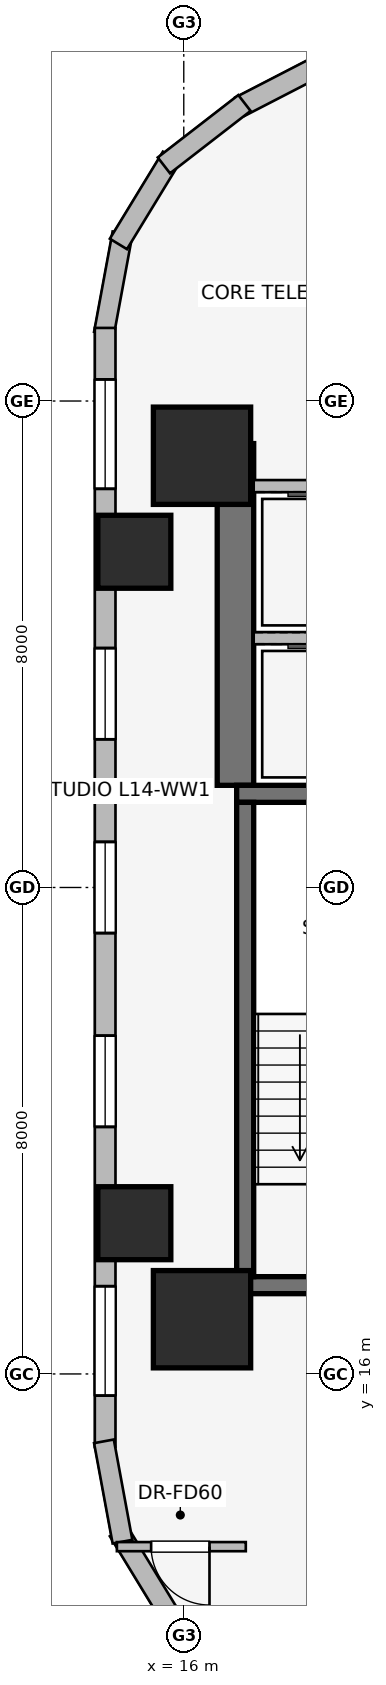
"""IFC4 building model, lengths in metres.
Left out: names, types, materials, properties, quantities, classifications, styles, units other than length and angle.
Written with IfcOpenShell. Run it as: python <this file> out.ifc"""

import sys

from ifc_helpers import new_model, si_unit, direction, frame, frame_2d, origin, origin_2d, place, context, subcontext, project, spatial, rectangle, extrude, element, fill, save


model = new_model("IFC4")
c1 = context("Model", 3, precision=1e-05, world=origin(), true_north=direction((0.0, 1.0)))
c2 = subcontext(c1, "Body", "Model", "MODEL_VIEW")
j1 = project(units=[si_unit("LENGTHUNIT", "METRE"), si_unit("PLANEANGLEUNIT", "RADIAN")], contexts=[c1])
p1 = place(None, origin())
s1 = spatial("IfcSite", under=j1, at=p1, CompositionType="ELEMENT")
p2 = place(p1, origin())
s2 = spatial("IfcBuilding", under=s1, at=p2, CompositionType="ELEMENT")
p3 = place(p2, frame((0.0, 0.0, 56.2)))
s3 = spatial("IfcBuildingStorey", under=s2, at=p3, CompositionType="ELEMENT", Elevation=56.2)
p4 = place(p3, frame((16.85, 25.68, 0.0), z_axis=(0.0, 0.0, 1.0), x_axis=(0.0, 1.0, 0.0)))
e1 = element("IfcWall", 1, at=p4, inside=s3, PredefinedType="SHEAR", context=c2, shape_type="SweptSolid", body=[
    extrude(rectangle(XDim=5.62, YDim=0.6, at=frame_2d((2.81, 0.0))), origin(), (0.0, 0.0, 1.0), 3.65),
])
for number, where, z_axis, x_axis in (
    (2, (16.87, 17.46, 0.0), (0.0, 0.0, 1.0), (1.0, 0.0, 0.0)),
    (3, (20.63, 25.54, 0.0), (0.0, 0.0, 1.0), (-1.0, 0.0, 0.0)),
):
    element("IfcWall", number, at=place(p3, frame(where, z_axis=z_axis, x_axis=x_axis)), inside=s3, PredefinedType="SHEAR", context=c2, shape_type="SweptSolid", body=[
        extrude(rectangle(XDim=3.76, YDim=0.28, at=frame_2d((1.88, 0.0))), origin(), (0.0, 0.0, 1.0), 3.65),
    ])
p5 = place(p3, frame((17.01, 25.4, 0.0), z_axis=(0.0, 0.0, 1.0), x_axis=(0.0, -1.0, 0.0)))
e4 = element("IfcWall", 4, at=p5, inside=s3, PredefinedType="SHEAR", context=c2, shape_type="SweptSolid", body=[
    extrude(rectangle(XDim=7.8, YDim=0.28, at=frame_2d((3.9, 0.0))), origin(), (0.0, 0.0, 1.0), 3.65),
])
for number, where, z_axis, x_axis in (
    (5, (16.3, 16.9, 0.0), (0.0, 0.0, 1.0), (1.0, 0.0, 0.0)),
    (6, (16.3, 31.1, 0.0), (0.0, 0.0, 1.0), (1.0, 0.0, 0.0)),
):
    element("IfcColumn", number, at=place(p3, frame(where, z_axis=z_axis, x_axis=x_axis)), inside=s3, PredefinedType="COLUMN", context=c2, shape_type="SweptSolid", body=[
        extrude(rectangle(XDim=1.6, YDim=1.6, at=origin_2d()), origin(), (0.0, 0.0, 1.0), 3.65),
    ])
for number, where, z_axis, x_axis in (
    (7, (15.187, 29.521, 0.0), (0.0, 0.0, 1.0), (1.0, 0.0, 0.0)),
    (8, (15.187, 18.479, 0.0), (0.0, 0.0, 1.0), (1.0, 0.0, 0.0)),
):
    element("IfcColumn", number, at=place(p3, frame(where, z_axis=z_axis, x_axis=x_axis)), inside=s3, PredefinedType="COLUMN", context=c2, shape_type="SweptSolid", body=[
        extrude(rectangle(XDim=1.2, YDim=1.2, at=origin_2d()), origin(), (0.0, 0.0, 1.0), 3.65),
    ])
p6 = place(p3, frame((16.924, 36.841, 0.0), z_axis=(0.0, 0.0, 1.0), x_axis=(0.888634413993, 0.458616264721, 0.0)))
e9 = element("IfcWall", 9, at=p6, inside=s3, PredefinedType="STANDARD", context=c2, shape_type="SweptSolid", body=[
    extrude(rectangle(XDim=20.531, YDim=0.34, at=frame_2d((10.266, 0.0))), origin(), (0.0, 0.0, 1.0), 2.654),
])
p7 = place(p6, frame((2.161, 0.0, 0.75)))
e10 = element("IfcOpeningElement", 10, at=p7, cuts=e9, PredefinedType="OPENING", context=c2, shape_type="SweptSolid", body=[
    extrude(rectangle(XDim=1.05, YDim=1.4, at=frame_2d((0.525, 0.7))), frame((0.0, 0.18, 0.0), z_axis=(0.0, -1.0, 0.0), x_axis=(1.0, 0.0, 0.0)), (0.0, 0.0, 1.0), 0.36),
])
p8 = place(p6, frame((5.903, 0.0, 0.75)))
e11 = element("IfcOpeningElement", 11, at=p8, cuts=e9, PredefinedType="OPENING", context=c2, shape_type="SweptSolid", body=[
    extrude(rectangle(XDim=1.5, YDim=1.5, at=frame_2d((0.75, 0.75))), frame((0.0, 0.18, 0.0), z_axis=(0.0, -1.0, 0.0), x_axis=(1.0, 0.0, 0.0)), (0.0, 0.0, 1.0), 0.36),
])
p9 = place(p6, frame((9.516, 0.0, 0.75)))
e12 = element("IfcOpeningElement", 12, at=p9, cuts=e9, PredefinedType="OPENING", context=c2, shape_type="SweptSolid", body=[
    extrude(rectangle(XDim=1.5, YDim=1.5, at=frame_2d((0.75, 0.75))), frame((0.0, 0.18, 0.0), z_axis=(0.0, -1.0, 0.0), x_axis=(1.0, 0.0, 0.0)), (0.0, 0.0, 1.0), 0.36),
])
p10 = place(p6, frame((13.129, 0.0, 0.75)))
e13 = element("IfcOpeningElement", 13, at=p10, cuts=e9, PredefinedType="OPENING", context=c2, shape_type="SweptSolid", body=[
    extrude(rectangle(XDim=1.5, YDim=1.5, at=frame_2d((0.75, 0.75))), frame((0.0, 0.18, 0.0), z_axis=(0.0, -1.0, 0.0), x_axis=(1.0, 0.0, 0.0)), (0.0, 0.0, 1.0), 0.36),
])
p11 = place(p6, frame((17.476, 0.0, 0.75)))
e14 = element("IfcOpeningElement", 14, at=p11, cuts=e9, PredefinedType="OPENING", context=c2, shape_type="SweptSolid", body=[
    extrude(rectangle(XDim=1.05, YDim=1.4, at=frame_2d((0.525, 0.7))), frame((0.0, 0.18, 0.0), z_axis=(0.0, -1.0, 0.0), x_axis=(1.0, 0.0, 0.0)), (0.0, 0.0, 1.0), 0.36),
])
p12 = place(p3, frame((14.687, 33.108, 0.0), z_axis=(0.0, 0.0, 1.0), x_axis=(0.181714143354, 0.983351397063, 0.0)))
e15 = element("IfcWall", 15, at=p12, inside=s3, PredefinedType="STANDARD", context=c2, shape_type="SweptSolid", body=[
    extrude(rectangle(XDim=1.678, YDim=0.33, at=frame_2d((0.839, 0.0))), origin(), (0.0, 0.0, 1.0), 3.36),
])
p13 = place(p3, frame((14.925, 34.583, 0.0), z_axis=(0.0, 0.0, 1.0), x_axis=(0.520584129191, 0.853810379671, 0.0)))
e16 = element("IfcWall", 16, at=p13, inside=s3, PredefinedType="STANDARD", context=c2, shape_type="SweptSolid", body=[
    extrude(rectangle(XDim=1.677, YDim=0.33, at=frame_2d((0.838, 0.0))), origin(), (0.0, 0.0, 1.0), 3.36),
])
p14 = place(p3, frame((15.673, 35.875, 0.0), z_axis=(0.0, 0.0, 1.0), x_axis=(0.790691856293, 0.61221433207, 0.0)))
e17 = element("IfcWall", 17, at=p14, inside=s3, PredefinedType="STANDARD", context=c2, shape_type="SweptSolid", body=[
    extrude(rectangle(XDim=1.676, YDim=0.33, at=frame_2d((0.838, 0.0))), origin(), (0.0, 0.0, 1.0), 3.36),
])
p15 = place(p3, frame((14.707, 14.798, 0.0), z_axis=(0.0, 0.0, 1.0), x_axis=(0.0, 1.0, 0.0)))
e18 = element("IfcWall", 18, at=p15, inside=s3, PredefinedType="STANDARD", context=c2, shape_type="SweptSolid", body=[
    extrude(rectangle(XDim=18.404, YDim=0.34, at=frame_2d((9.202, 0.0))), origin(), (0.0, 0.0, 1.0), 2.654),
])
p16 = place(p15, frame((0.845, 0.0, 0.75)))
e19 = element("IfcOpeningElement", 19, at=p16, cuts=e18, PredefinedType="OPENING", context=c2, shape_type="SweptSolid", body=[
    extrude(rectangle(XDim=1.8, YDim=1.5, at=frame_2d((0.9, 0.75))), frame((0.0, 0.18, 0.0), z_axis=(0.0, -1.0, 0.0), x_axis=(1.0, 0.0, 0.0)), (0.0, 0.0, 1.0), 0.36),
])
p17 = place(p15, frame((5.265, 0.0, 0.75)))
e20 = element("IfcOpeningElement", 20, at=p17, cuts=e18, PredefinedType="OPENING", context=c2, shape_type="SweptSolid", body=[
    extrude(rectangle(XDim=1.5, YDim=1.5, at=frame_2d((0.75, 0.75))), frame((0.0, 0.18, 0.0), z_axis=(0.0, -1.0, 0.0), x_axis=(1.0, 0.0, 0.0)), (0.0, 0.0, 1.0), 0.36),
])
p18 = place(p15, frame((8.452, 0.0, 0.75)))
e21 = element("IfcOpeningElement", 21, at=p18, cuts=e18, PredefinedType="OPENING", context=c2, shape_type="SweptSolid", body=[
    extrude(rectangle(XDim=1.5, YDim=1.5, at=frame_2d((0.75, 0.75))), frame((0.0, 0.18, 0.0), z_axis=(0.0, -1.0, 0.0), x_axis=(1.0, 0.0, 0.0)), (0.0, 0.0, 1.0), 0.36),
])
p19 = place(p15, frame((11.639, 0.0, 0.75)))
e22 = element("IfcOpeningElement", 22, at=p19, cuts=e18, PredefinedType="OPENING", context=c2, shape_type="SweptSolid", body=[
    extrude(rectangle(XDim=1.5, YDim=1.5, at=frame_2d((0.75, 0.75))), frame((0.0, 0.18, 0.0), z_axis=(0.0, -1.0, 0.0), x_axis=(1.0, 0.0, 0.0)), (0.0, 0.0, 1.0), 0.36),
])
p20 = place(p15, frame((15.758, 0.0, 0.75)))
e23 = element("IfcOpeningElement", 23, at=p20, cuts=e18, PredefinedType="OPENING", context=c2, shape_type="SweptSolid", body=[
    extrude(rectangle(XDim=1.8, YDim=1.5, at=frame_2d((0.9, 0.75))), frame((0.0, 0.18, 0.0), z_axis=(0.0, -1.0, 0.0), x_axis=(1.0, 0.0, 0.0)), (0.0, 0.0, 1.0), 0.36),
])
p21 = place(p3, frame((16.998, 11.099, 0.0), z_axis=(0.0, 0.0, 1.0), x_axis=(-0.790691856293, 0.61221433207, 0.0)))
e24 = element("IfcWall", 24, at=p21, inside=s3, PredefinedType="STANDARD", context=c2, shape_type="SweptSolid", body=[
    extrude(rectangle(XDim=1.676, YDim=0.33, at=frame_2d((0.838, 0.0))), origin(), (0.0, 0.0, 1.0), 3.36),
])
p22 = place(p3, frame((15.798, 11.985, 0.0), z_axis=(0.0, 0.0, 1.0), x_axis=(-0.520584129191, 0.853810379671, 0.0)))
e25 = element("IfcWall", 25, at=p22, inside=s3, PredefinedType="STANDARD", context=c2, shape_type="SweptSolid", body=[
    extrude(rectangle(XDim=1.677, YDim=0.33, at=frame_2d((0.838, 0.0))), origin(), (0.0, 0.0, 1.0), 3.36),
])
p23 = place(p3, frame((14.992, 13.242, 0.0), z_axis=(0.0, 0.0, 1.0), x_axis=(-0.181714143354, 0.983351397063, 0.0)))
e26 = element("IfcWall", 26, at=p23, inside=s3, PredefinedType="STANDARD", context=c2, shape_type="SweptSolid", body=[
    extrude(rectangle(XDim=1.678, YDim=0.33, at=frame_2d((0.839, 0.0))), origin(), (0.0, 0.0, 1.0), 3.36),
])
p24 = place(p3, frame((17.15, 28.1, 0.0), z_axis=(0.0, 0.0, 1.0), x_axis=(1.0, 0.0, 0.0)))
e27 = element("IfcWall", 27, at=p24, inside=s3, PredefinedType="PARTITIONING", context=c2, shape_type="SweptSolid", body=[
    extrude(rectangle(XDim=2.5, YDim=0.2, at=frame_2d((1.25, 0.0))), origin(), (0.0, 0.0, 1.0), 3.36),
])
p25 = place(p3, frame((19.65, 30.6, 0.0), z_axis=(0.0, 0.0, 1.0), x_axis=(-1.0, 0.0, 0.0)))
e28 = element("IfcWall", 28, at=p25, inside=s3, PredefinedType="PARTITIONING", context=c2, shape_type="SweptSolid", body=[
    extrude(rectangle(XDim=2.5, YDim=0.2, at=frame_2d((1.25, 0.0))), origin(), (0.0, 0.0, 1.0), 2.26),
])
p26 = place(p3, frame((17.02, 13.16, 0.0), z_axis=(0.0, 0.0, 1.0), x_axis=(-1.0, 0.0, 0.0)))
e29 = element("IfcWall", 29, at=p26, inside=s3, PredefinedType="PARTITIONING", context=c2, shape_type="SweptSolid", body=[
    extrude(rectangle(XDim=2.12, YDim=0.15, at=frame_2d((1.06, 0.0))), origin(), (0.0, 0.0, 1.0), 3.36),
])
p27 = place(p26, frame((0.597, 0.0, 0.0)))
e30 = element("IfcOpeningElement", 30, at=p27, cuts=e29, PredefinedType="OPENING", context=c2, shape_type="SweptSolid", body=[
    extrude(rectangle(XDim=0.96, YDim=2.0, at=frame_2d((0.48, 1.0))), frame((0.0, 0.085, 0.0), z_axis=(0.0, -1.0, 0.0), x_axis=(1.0, 0.0, 0.0)), (0.0, 0.0, 1.0), 0.17),
])
p28 = place(p16, origin())
e31 = element("IfcWindow", 31, at=p28, inside=s3, PartitioningType="SINGLE_PANEL", PredefinedType="WINDOW", context=c2, shape_type="SweptSolid", body=[
    extrude(rectangle(XDim=1.8, YDim=1.5, at=frame_2d((0.9, 0.75))), frame((0.0, 0.03, 0.0), z_axis=(0.0, -1.0, 0.0), x_axis=(1.0, 0.0, 0.0)), (0.0, 0.0, 1.0), 0.06),
])
fill(e19, e31)
p29 = place(p17, origin())
e32 = element("IfcWindow", 32, at=p29, inside=s3, PartitioningType="SINGLE_PANEL", PredefinedType="WINDOW", context=c2, shape_type="SweptSolid", body=[
    extrude(rectangle(XDim=1.5, YDim=1.5, at=frame_2d((0.75, 0.75))), frame((0.0, 0.03, 0.0), z_axis=(0.0, -1.0, 0.0), x_axis=(1.0, 0.0, 0.0)), (0.0, 0.0, 1.0), 0.06),
])
fill(e20, e32)
p30 = place(p18, origin())
e33 = element("IfcWindow", 33, at=p30, inside=s3, PartitioningType="SINGLE_PANEL", PredefinedType="WINDOW", context=c2, shape_type="SweptSolid", body=[
    extrude(rectangle(XDim=1.5, YDim=1.5, at=frame_2d((0.75, 0.75))), frame((0.0, 0.03, 0.0), z_axis=(0.0, -1.0, 0.0), x_axis=(1.0, 0.0, 0.0)), (0.0, 0.0, 1.0), 0.06),
])
fill(e21, e33)
p31 = place(p19, origin())
e34 = element("IfcWindow", 34, at=p31, inside=s3, PartitioningType="SINGLE_PANEL", PredefinedType="WINDOW", context=c2, shape_type="SweptSolid", body=[
    extrude(rectangle(XDim=1.5, YDim=1.5, at=frame_2d((0.75, 0.75))), frame((0.0, 0.03, 0.0), z_axis=(0.0, -1.0, 0.0), x_axis=(1.0, 0.0, 0.0)), (0.0, 0.0, 1.0), 0.06),
])
fill(e22, e34)
p32 = place(p20, origin())
e35 = element("IfcWindow", 35, at=p32, inside=s3, PartitioningType="SINGLE_PANEL", PredefinedType="WINDOW", context=c2, shape_type="SweptSolid", body=[
    extrude(rectangle(XDim=1.8, YDim=1.5, at=frame_2d((0.9, 0.75))), frame((0.0, 0.03, 0.0), z_axis=(0.0, -1.0, 0.0), x_axis=(1.0, 0.0, 0.0)), (0.0, 0.0, 1.0), 0.06),
])
fill(e23, e35)
p33 = place(p27, origin())
e36 = element("IfcDoor", 36, at=p33, inside=s3, OperationType="SINGLE_SWING_LEFT", PredefinedType="DOOR", context=c2, shape_type="SweptSolid", body=[
    extrude(rectangle(XDim=0.96, YDim=2.0, at=frame_2d((0.48, 1.0))), frame((0.0, 0.025, 0.0), z_axis=(0.0, -1.0, 0.0), x_axis=(1.0, 0.0, 0.0)), (0.0, 0.0, 1.0), 0.05),
])
fill(e30, e36)
save(model, sys.argv[1])
